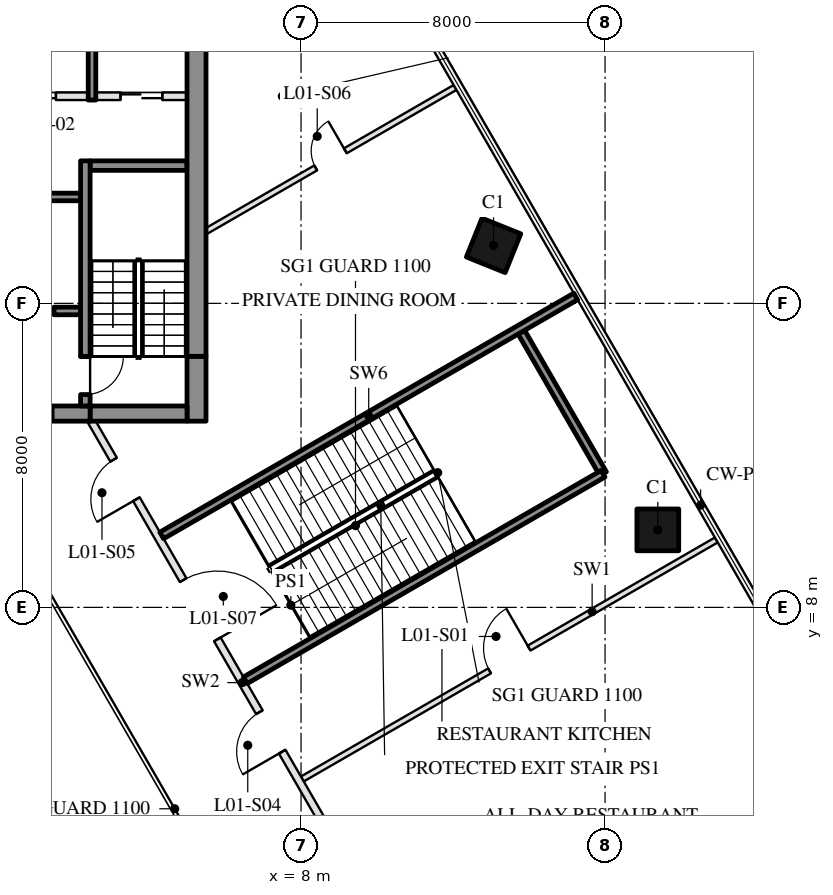
"""IFC4 building model, lengths in metres.
Left out: names, types, materials, properties, quantities, classifications, styles, units other than length and angle.
Written with IfcOpenShell. Run it as: python <this file> out.ifc"""

import sys

from ifc_helpers import new_model, si_unit, direction, frame, frame_2d, origin, origin_2d, place, context, subcontext, project, spatial, rectangle, hollow_rectangle, extrude, boolean, halfspace, element, fill, save


model = new_model("IFC4")
c1 = context("Model", 3, precision=1e-05, world=origin(), true_north=direction((0.0, 1.0)))
c2 = subcontext(c1, "Body", "Model", "MODEL_VIEW")
j1 = project(units=[si_unit("LENGTHUNIT", "METRE"), si_unit("PLANEANGLEUNIT", "RADIAN")], contexts=[c1])
p1 = place(None, origin())
s1 = spatial("IfcSite", under=j1, at=p1, CompositionType="ELEMENT")
p2 = place(p1, origin())
s2 = spatial("IfcBuilding", under=s1, at=p2, CompositionType="ELEMENT")
p3 = place(p2, frame((0.0, 0.0, 9.0)))
s3 = spatial("IfcBuildingStorey", under=s2, at=p3, CompositionType="ELEMENT", Elevation=9.0)
p4 = place(p3, frame((17.388, 10.039, 0.0), z_axis=(-0.098846347324, -0.057091321784, 0.993463628221), x_axis=(-0.500071807692, 0.865983941567, 9.961389e-06)))
e1 = element("IfcColumn", 1, at=p4, inside=s3, PredefinedType="COLUMN", context=c2, shape_type="SweptSolid", body=[
    boolean("DIFFERENCE", boolean("DIFFERENCE", extrude(hollow_rectangle(XDim=1.1, YDim=1.1, WallThickness=0.05, at=origin_2d()), origin(), (0.0, 0.0, 1.0), 6.543), halfspace(frame((0.0, 0.0, 0.015), z_axis=(0.0, 0.0, 1.0), x_axis=(1.0, 0.0, 0.0)), True)), halfspace(frame((0.0, 0.0, 6.528), z_axis=(0.0, 0.0, 1.0), x_axis=(1.0, 0.0, 0.0)), False)),
])
p5 = place(p3, frame((13.066, 17.525, 0.0), z_axis=(-0.075817777457, -0.096766445564, 0.992415195185), x_axis=(-0.501683757676, 0.86383242032, 0.045901600061)))
e2 = element("IfcColumn", 2, at=p5, inside=s3, PredefinedType="COLUMN", context=c2, shape_type="SweptSolid", body=[
    boolean("DIFFERENCE", boolean("DIFFERENCE", extrude(hollow_rectangle(XDim=1.1, YDim=1.1, WallThickness=0.05, at=origin_2d()), origin(), (0.0, 0.0, 1.0), 6.55), halfspace(frame((0.0, 0.0, 0.017), z_axis=(0.0, 0.0, 1.0), x_axis=(1.0, 0.0, 0.0)), True)), halfspace(frame((0.0, 0.0, 6.534), z_axis=(0.0, 0.0, 1.0), x_axis=(1.0, 0.0, 0.0)), False)),
])
p6 = place(p3, frame((5.0, 19.625, 0.0), z_axis=(0.0, 0.0, 1.0), x_axis=(-1.0, 0.0, 0.0)))
e3 = element("IfcWall", 3, at=p6, inside=s3, PredefinedType="SHEAR", context=c2, shape_type="SweptSolid", body=[
    extrude(rectangle(XDim=2.55, YDim=0.25, at=frame_2d((1.275, 0.0))), origin(), (0.0, 0.0, 1.0), 6.15),
])
p7 = place(p3, frame((2.2, 18.8, 0.0), z_axis=(0.0, 0.0, 1.0), x_axis=(-1.0, 0.0, 0.0)))
e4 = element("IfcWall", 4, at=p7, inside=s3, PredefinedType="SHEAR", context=c2, shape_type="SweptSolid", body=[
    extrude(rectangle(XDim=2.8, YDim=0.2, at=frame_2d((1.4, 0.0))), origin(), (0.0, 0.0, 1.0), 6.15),
])
p8 = place(p3, frame((2.2, 15.8, 0.0), z_axis=(0.0, 0.0, 1.0), x_axis=(-1.0, 0.0, 0.0)))
e5 = element("IfcWall", 5, at=p8, inside=s3, PredefinedType="SHEAR", context=c2, shape_type="SweptSolid", body=[
    extrude(rectangle(XDim=2.8, YDim=0.2, at=frame_2d((1.4, 0.0))), origin(), (0.0, 0.0, 1.0), 6.15),
])
p9 = place(p8, frame((0.7, 0.0, 0.0)))
e6 = element("IfcOpeningElement", 6, at=p9, cuts=e5, PredefinedType="OPENING", context=c2, shape_type="SweptSolid", body=[
    extrude(rectangle(XDim=1.2, YDim=2.1, at=frame_2d((0.6, 1.05))), frame((0.0, 0.11, 0.0), z_axis=(0.0, -1.0, 0.0), x_axis=(1.0, 0.0, 0.0)), (0.0, 0.0, 1.0), 0.22),
])
p10 = place(p3, frame((2.5, 21.35, 0.0), z_axis=(0.0, 0.0, 1.0), x_axis=(0.0, 1.0, 0.0)))
e7 = element("IfcWall", 7, at=p10, inside=s3, PredefinedType="SHEAR", context=c2, shape_type="SweptSolid", body=[
    extrude(rectangle(XDim=2.8, YDim=0.2, at=frame_2d((1.4, 0.0))), origin(), (0.0, 0.0, 1.0), 6.15),
])
p11 = place(p3, frame((5.0, 21.45, 0.0), z_axis=(0.0, 0.0, 1.0), x_axis=(-1.0, 0.0, 0.0)))
e8 = element("IfcWall", 8, at=p11, inside=s3, PredefinedType="PARTITIONING", context=c2, shape_type="SweptSolid", body=[
    extrude(rectangle(XDim=2.4, YDim=0.2, at=frame_2d((1.2, 0.0))), origin(), (0.0, 0.0, 1.0), 6.15),
])
p12 = place(p11, frame((0.65, 0.0, 0.0)))
e9 = element("IfcOpeningElement", 9, at=p12, cuts=e8, PredefinedType="OPENING", context=c2, shape_type="SweptSolid", body=[
    extrude(rectangle(XDim=1.1, YDim=2.1, at=frame_2d((0.55, 1.05))), frame((0.0, 0.11, 0.0), z_axis=(0.0, -1.0, 0.0), x_axis=(1.0, 0.0, 0.0)), (0.0, 0.0, 1.0), 0.22),
])
p13 = place(p3, frame((2.4, 21.45, 0.0), z_axis=(0.0, 0.0, 1.0), x_axis=(-1.0, 0.0, 0.0)))
e10 = element("IfcWall", 10, at=p13, inside=s3, PredefinedType="PARTITIONING", context=c2, shape_type="SweptSolid", body=[
    extrude(rectangle(XDim=2.8, YDim=0.2, at=frame_2d((1.4, 0.0))), origin(), (0.0, 0.0, 1.0), 6.15),
])
p14 = place(p13, frame((0.85, 0.0, 0.0)))
e11 = element("IfcOpeningElement", 11, at=p14, cuts=e10, PredefinedType="OPENING", context=c2, shape_type="SweptSolid", body=[
    extrude(rectangle(XDim=1.1, YDim=2.1, at=frame_2d((0.55, 1.05))), frame((0.0, 0.11, 0.0), z_axis=(0.0, -1.0, 0.0), x_axis=(1.0, 0.0, 0.0)), (0.0, 0.0, 1.0), 0.22),
])
p15 = place(p3, frame((5.25, 12.9, 0.0), z_axis=(0.0, 0.0, 1.0), x_axis=(0.0, 1.0, 0.0)))
e12 = element("IfcWall", 12, at=p15, inside=s3, PredefinedType="SHEAR", context=c2, shape_type="SweptSolid", body=[
    extrude(rectangle(XDim=1.706, YDim=0.5, at=frame_2d((0.853, 0.0))), origin(), (0.0, 0.0, 1.0), 6.15),
])
p16 = place(p3, frame((5.25, 14.606, 0.0), z_axis=(0.0, 0.0, 1.0), x_axis=(0.0, 1.0, 0.0)))
e13 = element("IfcWall", 13, at=p16, inside=s3, PredefinedType="SHEAR", context=c2, shape_type="SweptSolid", body=[
    extrude(rectangle(XDim=13.894, YDim=0.5, at=frame_2d((6.947, 0.0))), origin(), (0.0, 0.0, 1.0), 6.15),
])
p17 = place(p3, frame((5.0, 13.1, 0.0), z_axis=(0.0, 0.0, 1.0), x_axis=(-1.0, 0.0, 0.0)))
e14 = element("IfcWall", 14, at=p17, inside=s3, PredefinedType="SHEAR", context=c2, shape_type="SweptSolid", body=[
    extrude(rectangle(XDim=2.55, YDim=0.4, at=frame_2d((1.275, 0.0))), origin(), (0.0, 0.0, 1.0), 6.15),
])
p18 = place(p3, frame((2.45, 13.1, 0.0), z_axis=(0.0, 0.0, 1.0), x_axis=(-1.0, 0.0, 0.0)))
e15 = element("IfcWall", 15, at=p18, inside=s3, PredefinedType="SHEAR", context=c2, shape_type="SweptSolid", body=[
    extrude(rectangle(XDim=7.45, YDim=0.4, at=frame_2d((3.725, 0.0))), origin(), (0.0, 0.0, 1.0), 6.15),
])
p19 = place(p18, frame((1.0, 0.0, 0.0)))
e16 = element("IfcOpeningElement", 16, at=p19, cuts=e15, PredefinedType="OPENING", context=c2, shape_type="SweptSolid", body=[
    extrude(rectangle(XDim=1.1, YDim=2.1, at=frame_2d((0.55, 1.05))), frame((0.0, 0.21, 0.0), z_axis=(0.0, -1.0, 0.0), x_axis=(1.0, 0.0, 0.0)), (0.0, 0.0, 1.0), 0.42),
])
p20 = place(p18, frame((3.3, 0.0, 0.0)))
e17 = element("IfcOpeningElement", 17, at=p20, cuts=e15, PredefinedType="OPENING", context=c2, shape_type="SweptSolid", body=[
    extrude(rectangle(XDim=1.4, YDim=2.1, at=frame_2d((0.7, 1.05))), frame((0.0, 0.21, 0.0), z_axis=(0.0, -1.0, 0.0), x_axis=(1.0, 0.0, 0.0)), (0.0, 0.0, 1.0), 0.42),
])
p21 = place(p3, frame((2.325, 13.3, 0.0), z_axis=(0.0, 0.0, 1.0), x_axis=(0.0, 1.0, 0.0)))
e18 = element("IfcWall", 18, at=p21, inside=s3, PredefinedType="SHEAR", context=c2, shape_type="SweptSolid", body=[
    extrude(rectangle(XDim=1.306, YDim=0.25, at=frame_2d((0.653, 0.0))), origin(), (0.0, 0.0, 1.0), 6.15),
])
p22 = place(p21, frame((0.3, 0.0, 0.0)))
e19 = element("IfcOpeningElement", 19, at=p22, cuts=e18, PredefinedType="OPENING", context=c2, shape_type="SweptSolid", body=[
    extrude(rectangle(XDim=1.0, YDim=2.1, at=frame_2d((0.5, 1.05))), frame((0.0, 0.135, 0.0), z_axis=(0.0, -1.0, 0.0), x_axis=(1.0, 0.0, 0.0)), (0.0, 0.0, 1.0), 0.27),
])
p23 = place(p3, frame((2.325, 14.606, 0.0), z_axis=(0.0, 0.0, 1.0), x_axis=(0.0, 1.0, 0.0)))
e20 = element("IfcWall", 20, at=p23, inside=s3, PredefinedType="SHEAR", context=c2, shape_type="SweptSolid", body=[
    extrude(rectangle(XDim=5.144, YDim=0.25, at=frame_2d((2.572, 0.0))), origin(), (0.0, 0.0, 1.0), 6.15),
])
p24 = place(p3, frame((15.948, 11.517, 0.0), z_axis=(0.0, 0.0, 1.0), x_axis=(-0.499986217557, 0.866033360935, 0.0)))
e21 = element("IfcWall", 21, at=p24, inside=s3, PredefinedType="SOLIDWALL", context=c2, shape_type="SweptSolid", body=[
    extrude(rectangle(XDim=4.3, YDim=0.2, at=frame_2d((2.15, 0.0))), origin(), (0.0, 0.0, 1.0), 6.15),
])
p25 = place(p3, frame((18.927, 9.773, 0.0), z_axis=(0.0, 0.0, 1.0), x_axis=(-0.866018800292, -0.500011437409, 0.0)))
e22 = element("IfcWall", 22, at=p25, inside=s3, PredefinedType="PARTITIONING", context=c2, shape_type="SweptSolid", body=[
    extrude(rectangle(XDim=12.578, YDim=0.15, at=frame_2d((6.289, 0.0))), origin(), (0.0, 0.0, 1.0), 5.55),
])
p26 = place(p25, frame((5.689, 0.0, 0.0)))
e23 = element("IfcOpeningElement", 23, at=p26, cuts=e22, PredefinedType="OPENING", context=c2, shape_type="SweptSolid", body=[
    extrude(rectangle(XDim=1.2, YDim=2.1, at=frame_2d((0.6, 1.05))), frame((0.0, 0.085, 0.0), z_axis=(0.0, -1.0, 0.0), x_axis=(1.0, 0.0, 0.0)), (0.0, 0.0, 1.0), 0.17),
])
p27 = place(p3, frame((15.948, 11.517, 0.0), z_axis=(0.0, 0.0, 1.0), x_axis=(-0.86602026553, -0.500008899612, 0.0)))
e24 = element("IfcWall", 24, at=p27, inside=s3, PredefinedType="SOLIDWALL", context=c2, shape_type="SweptSolid", body=[
    extrude(rectangle(XDim=10.87, YDim=0.2, at=frame_2d((5.435, 0.0))), origin(), (0.0, 0.0, 1.0), 6.15),
])
p28 = place(p3, frame((15.228, 16.182, 0.0), z_axis=(0.0, 0.0, 1.0), x_axis=(-0.866027204995, -0.499996880198, 0.0)))
e25 = element("IfcWall", 25, at=p28, inside=s3, PredefinedType="SOLIDWALL", context=c2, shape_type="SweptSolid", body=[
    extrude(rectangle(XDim=12.578, YDim=0.2, at=frame_2d((6.289, 0.0))), origin(), (0.0, 0.0, 1.0), 6.15),
])
p29 = place(p3, frame((12.052, 21.681, 0.0), z_axis=(0.0, 0.0, 1.0), x_axis=(-0.866018471794, -0.500012006368, 0.0)))
e26 = element("IfcWall", 26, at=p29, inside=s3, PredefinedType="PARTITIONING", context=c2, shape_type="SweptSolid", body=[
    extrude(rectangle(XDim=7.566, YDim=0.15, at=frame_2d((3.783, 0.0))), origin(), (0.0, 0.0, 1.0), 5.55),
])
p30 = place(p29, frame((3.333, 0.0, 0.0)))
e27 = element("IfcOpeningElement", 27, at=p30, cuts=e26, PredefinedType="OPENING", context=c2, shape_type="SweptSolid", body=[
    extrude(rectangle(XDim=0.9, YDim=2.1, at=frame_2d((0.45, 1.05))), frame((0.0, 0.085, 0.0), z_axis=(0.0, -1.0, 0.0), x_axis=(1.0, 0.0, 0.0)), (0.0, 0.0, 1.0), 0.17),
])
p31 = place(p3, frame((12.413, -4.3, 0.0), z_axis=(0.0, 0.0, 1.0), x_axis=(-0.50000478328, 0.866022642139, 0.0)))
e28 = element("IfcWall", 28, at=p31, inside=s3, PredefinedType="PARTITIONING", context=c2, shape_type="SweptSolid", body=[
    extrude(rectangle(XDim=19.861, YDim=0.2, at=frame_2d((9.931, 0.0))), origin(), (0.0, 0.0, 1.0), 5.36),
])
p32 = place(p31, frame((1.342, 0.0, 0.0)))
e29 = element("IfcOpeningElement", 29, at=p32, cuts=e28, PredefinedType="OPENING", context=c2, shape_type="SweptSolid", body=[
    extrude(rectangle(XDim=1.8, YDim=2.4, at=frame_2d((0.9, 1.2))), frame((0.0, 0.11, 0.0), z_axis=(0.0, -1.0, 0.0), x_axis=(1.0, 0.0, 0.0)), (0.0, 0.0, 1.0), 0.22),
])
p33 = place(p31, frame((5.825, 0.0, 0.0)))
e30 = element("IfcOpeningElement", 30, at=p33, cuts=e28, PredefinedType="OPENING", context=c2, shape_type="SweptSolid", body=[
    extrude(rectangle(XDim=1.8, YDim=2.4, at=frame_2d((0.9, 1.2))), frame((0.0, 0.11, 0.0), z_axis=(0.0, -1.0, 0.0), x_axis=(1.0, 0.0, 0.0)), (0.0, 0.0, 1.0), 0.22),
])
p34 = place(p31, frame((9.818, 0.0, 0.0)))
e31 = element("IfcOpeningElement", 31, at=p34, cuts=e28, PredefinedType="OPENING", context=c2, shape_type="SweptSolid", body=[
    extrude(rectangle(XDim=1.2, YDim=2.1, at=frame_2d((0.6, 1.05))), frame((0.0, 0.11, 0.0), z_axis=(0.0, -1.0, 0.0), x_axis=(1.0, 0.0, 0.0)), (0.0, 0.0, 1.0), 0.22),
])
p35 = place(p31, frame((17.49, 0.0, 0.0)))
e32 = element("IfcOpeningElement", 32, at=p35, cuts=e28, PredefinedType="OPENING", context=c2, shape_type="SweptSolid", body=[
    extrude(rectangle(XDim=1.2, YDim=2.1, at=frame_2d((0.6, 1.05))), frame((0.0, 0.11, 0.0), z_axis=(0.0, -1.0, 0.0), x_axis=(1.0, 0.0, 0.0)), (0.0, 0.0, 1.0), 0.22),
])
p36 = place(p31, frame((13.23, 0.0, 0.0)))
e33 = element("IfcOpeningElement", 33, at=p36, cuts=e28, PredefinedType="OPENING", context=c2, shape_type="SweptSolid", body=[
    extrude(rectangle(XDim=1.8, YDim=2.1, at=frame_2d((0.9, 1.05))), frame((0.0, 0.11, 0.0), z_axis=(0.0, -1.0, 0.0), x_axis=(1.0, 0.0, 0.0)), (0.0, 0.0, 1.0), 0.22),
])
p37 = place(p9, origin())
e34 = element("IfcDoor", 34, at=p37, inside=s3, OperationType="DOUBLE_DOOR_SLIDING", PredefinedType="DOOR", context=c2, shape_type="SweptSolid", body=[
    extrude(rectangle(XDim=1.2, YDim=2.1, at=frame_2d((0.6, 1.05))), frame((0.0, 0.025, 0.0), z_axis=(0.0, -1.0, 0.0), x_axis=(1.0, 0.0, 0.0)), (0.0, 0.0, 1.0), 0.05),
])
fill(e6, e34)
p38 = place(p12, origin())
e35 = element("IfcDoor", 35, at=p38, inside=s3, OperationType="DOUBLE_DOOR_SLIDING", PredefinedType="DOOR", context=c2, shape_type="SweptSolid", body=[
    extrude(rectangle(XDim=1.1, YDim=2.1, at=frame_2d((0.55, 1.05))), frame((0.0, 0.025, 0.0), z_axis=(0.0, -1.0, 0.0), x_axis=(1.0, 0.0, 0.0)), (0.0, 0.0, 1.0), 0.05),
])
fill(e9, e35)
p39 = place(p14, origin())
e36 = element("IfcDoor", 36, at=p39, inside=s3, OperationType="DOUBLE_DOOR_SLIDING", PredefinedType="DOOR", context=c2, shape_type="SweptSolid", body=[
    extrude(rectangle(XDim=1.1, YDim=2.1, at=frame_2d((0.55, 1.05))), frame((0.0, 0.025, 0.0), z_axis=(0.0, -1.0, 0.0), x_axis=(1.0, 0.0, 0.0)), (0.0, 0.0, 1.0), 0.05),
])
fill(e11, e36)
p40 = place(p22, frame((1.0, 0.0, 0.0), z_axis=(0.0, 0.0, 1.0), x_axis=(-1.0, 0.0, 0.0)))
e37 = element("IfcDoor", 37, at=p40, inside=s3, OperationType="SINGLE_SWING_LEFT", PredefinedType="DOOR", context=c2, shape_type="SweptSolid", body=[
    extrude(rectangle(XDim=1.0, YDim=2.1, at=frame_2d((0.5, 1.05))), frame((0.0, 0.025, 0.0), z_axis=(0.0, -1.0, 0.0), x_axis=(1.0, 0.0, 0.0)), (0.0, 0.0, 1.0), 0.05),
])
fill(e19, e37)
p41 = place(p26, frame((1.2, 0.0, 0.0), z_axis=(0.0, 0.0, 1.0), x_axis=(-1.0, 0.0, 0.0)))
e38 = element("IfcDoor", 38, at=p41, inside=s3, OperationType="SINGLE_SWING_RIGHT", PredefinedType="DOOR", context=c2, shape_type="SweptSolid", body=[
    extrude(rectangle(XDim=1.2, YDim=2.1, at=frame_2d((0.6, 1.05))), frame((0.0, 0.025, 0.0), z_axis=(0.0, -1.0, 0.0), x_axis=(1.0, 0.0, 0.0)), (0.0, 0.0, 1.0), 0.05),
])
fill(e23, e38)
p42 = place(p34, origin())
e39 = element("IfcDoor", 39, at=p42, inside=s3, OperationType="SINGLE_SWING_LEFT", PredefinedType="DOOR", context=c2, shape_type="SweptSolid", body=[
    extrude(rectangle(XDim=1.2, YDim=2.1, at=frame_2d((0.6, 1.05))), frame((0.0, 0.025, 0.0), z_axis=(0.0, -1.0, 0.0), x_axis=(1.0, 0.0, 0.0)), (0.0, 0.0, 1.0), 0.05),
])
fill(e31, e39)
p43 = place(p35, origin())
e40 = element("IfcDoor", 40, at=p43, inside=s3, OperationType="SINGLE_SWING_LEFT", PredefinedType="DOOR", context=c2, shape_type="SweptSolid", body=[
    extrude(rectangle(XDim=1.2, YDim=2.1, at=frame_2d((0.6, 1.05))), frame((0.0, 0.025, 0.0), z_axis=(0.0, -1.0, 0.0), x_axis=(1.0, 0.0, 0.0)), (0.0, 0.0, 1.0), 0.05),
])
fill(e32, e40)
p44 = place(p30, frame((0.9, 0.0, 0.0), z_axis=(0.0, 0.0, 1.0), x_axis=(-1.0, 0.0, 0.0)))
e41 = element("IfcDoor", 41, at=p44, inside=s3, OperationType="SINGLE_SWING_RIGHT", PredefinedType="DOOR", context=c2, shape_type="SweptSolid", body=[
    extrude(rectangle(XDim=0.9, YDim=2.1, at=frame_2d((0.45, 1.05))), frame((0.0, 0.025, 0.0), z_axis=(0.0, -1.0, 0.0), x_axis=(1.0, 0.0, 0.0)), (0.0, 0.0, 1.0), 0.05),
])
fill(e27, e41)
p45 = place(p36, frame((1.8, 0.0, 0.0), z_axis=(0.0, 0.0, 1.0), x_axis=(-1.0, 0.0, 0.0)))
e42 = element("IfcDoor", 42, at=p45, inside=s3, OperationType="DOUBLE_DOOR_SINGLE_SWING", PredefinedType="DOOR", context=c2, shape_type="SweptSolid", body=[
    extrude(rectangle(XDim=1.8, YDim=2.1, at=frame_2d((0.9, 1.05))), frame((0.0, 0.025, 0.0), z_axis=(0.0, -1.0, 0.0), x_axis=(1.0, 0.0, 0.0)), (0.0, 0.0, 1.0), 0.05),
])
fill(e33, e42)
save(model, sys.argv[1])
